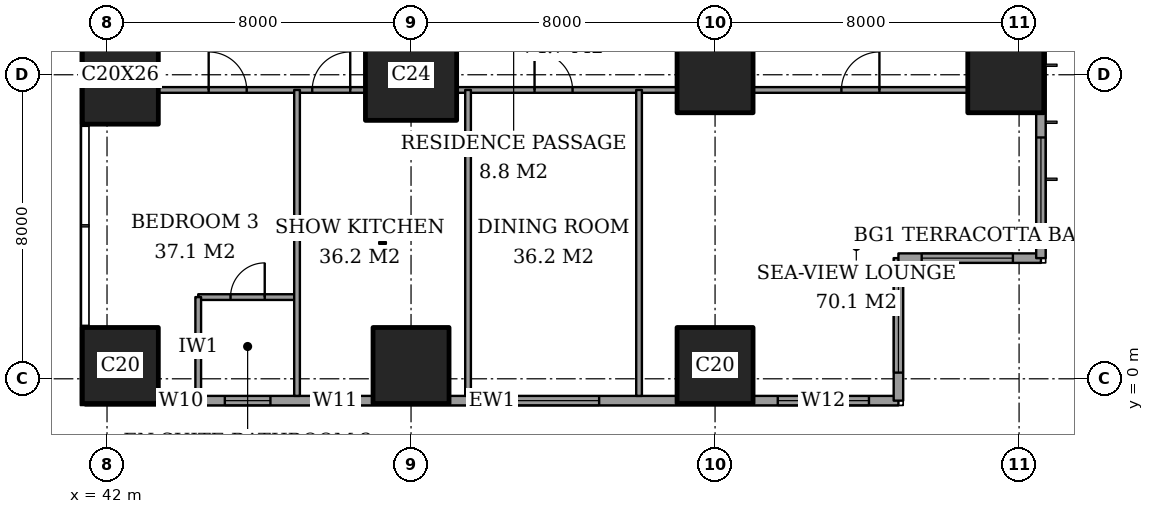
"""IFC4 building model, lengths in metres.
Left out: names, types, materials, properties, quantities, classifications, styles, units other than length and angle.
Written with IfcOpenShell. Run it as: python <this file> out.ifc"""

import sys

from ifc_helpers import new_model, si_unit, direction, frame, frame_2d, origin, origin_2d, place, context, subcontext, project, spatial, rectangle, extrude, element, fill, save


model = new_model("IFC4")
c1 = context("Model", 3, precision=1e-05, world=origin(), true_north=direction((0.0, 1.0)))
c2 = subcontext(c1, "Body", "Model", "MODEL_VIEW")
j1 = project(units=[si_unit("LENGTHUNIT", "METRE"), si_unit("PLANEANGLEUNIT", "RADIAN")], contexts=[c1])
p1 = place(None, origin())
s1 = spatial("IfcSite", under=j1, at=p1, CompositionType="ELEMENT")
p2 = place(p1, origin())
s2 = spatial("IfcBuilding", under=s1, at=p2, CompositionType="ELEMENT")
p3 = place(p2, frame((0.0, 0.0, 103.4)))
s3 = spatial("IfcBuildingStorey", under=s2, at=p3, CompositionType="ELEMENT", Elevation=103.4)
p4 = place(p3, frame((42.35, 0.35, 0.0), z_axis=(0.0, 0.0, 1.0), x_axis=(1.0, 0.0, 0.0)))
e1 = element("IfcColumn", 1, at=p4, inside=s3, PredefinedType="COLUMN", context=c2, shape_type="SweptSolid", body=[
    extrude(rectangle(XDim=2.0, YDim=2.0, at=origin_2d()), origin(), (0.0, 0.0, 1.0), 3.6),
])
p5 = place(p3, frame((42.35, 8.0, 0.0), z_axis=(0.0, 0.0, 1.0), x_axis=(1.0, 0.0, 0.0)))
e2 = element("IfcColumn", 2, at=p5, inside=s3, PredefinedType="COLUMN", context=c2, shape_type="SweptSolid", body=[
    extrude(rectangle(XDim=2.0, YDim=2.6, at=origin_2d()), origin(), (0.0, 0.0, 1.0), 3.6),
])
p6 = place(p3, frame((50.0, 0.35, 0.0), z_axis=(0.0, 0.0, 1.0), x_axis=(1.0, 0.0, 0.0)))
e3 = element("IfcColumn", 3, at=p6, inside=s3, PredefinedType="COLUMN", context=c2, shape_type="SweptSolid", body=[
    extrude(rectangle(XDim=2.0, YDim=2.0, at=origin_2d()), origin(), (0.0, 0.0, 1.0), 3.6),
])
p7 = place(p3, frame((50.0, 8.0, 0.0), z_axis=(0.0, 0.0, 1.0), x_axis=(1.0, 0.0, 0.0)))
e4 = element("IfcColumn", 4, at=p7, inside=s3, PredefinedType="COLUMN", context=c2, shape_type="SweptSolid", body=[
    extrude(rectangle(XDim=2.4, YDim=2.4, at=origin_2d()), origin(), (0.0, 0.0, 1.0), 3.6),
])
for number, where, z_axis, x_axis in (
    (5, (58.0, 0.35, 0.0), (0.0, 0.0, 1.0), (1.0, 0.0, 0.0)),
    (6, (58.0, 8.0, 0.0), (0.0, 0.0, 1.0), (1.0, 0.0, 0.0)),
    (7, (65.65, 8.0, 0.0), (0.0, 0.0, 1.0), (1.0, 0.0, 0.0)),
):
    element("IfcColumn", number, at=place(p3, frame(where, z_axis=z_axis, x_axis=x_axis)), inside=s3, PredefinedType="COLUMN", context=c2, shape_type="SweptSolid", body=[
        extrude(rectangle(XDim=2.0, YDim=2.0, at=origin_2d()), origin(), (0.0, 0.0, 1.0), 3.6),
    ])
p8 = place(p3, frame((41.425, -0.575, 0.0), z_axis=(0.0, 0.0, 1.0), x_axis=(1.0, 0.0, 0.0)))
e8 = element("IfcWall", 8, at=p8, inside=s3, PredefinedType="SOLIDWALL", context=c2, shape_type="SweptSolid", body=[
    extrude(rectangle(XDim=21.4, YDim=0.25, at=frame_2d((10.7, 0.0))), origin(), (0.0, 0.0, 1.0), 3.6),
])
p9 = place(p8, frame((2.225, 0.0, 0.4)))
e9 = element("IfcOpeningElement", 9, at=p9, cuts=e8, PredefinedType="OPENING", context=c2, shape_type="SweptSolid", body=[
    extrude(rectangle(XDim=0.6, YDim=2.2, at=frame_2d((0.3, 1.1))), frame((0.0, 0.135, 0.0), z_axis=(0.0, -1.0, 0.0), x_axis=(1.0, 0.0, 0.0)), (0.0, 0.0, 1.0), 0.27),
])
p10 = place(p8, frame((3.675, 0.0, 0.4)))
e10 = element("IfcOpeningElement", 10, at=p10, cuts=e8, PredefinedType="OPENING", context=c2, shape_type="SweptSolid", body=[
    extrude(rectangle(XDim=1.2, YDim=2.2, at=frame_2d((0.6, 1.1))), frame((0.0, 0.135, 0.0), z_axis=(0.0, -1.0, 0.0), x_axis=(1.0, 0.0, 0.0)), (0.0, 0.0, 1.0), 0.27),
])
p11 = place(p8, frame((5.975, 0.0, 0.4)))
e11 = element("IfcOpeningElement", 11, at=p11, cuts=e8, PredefinedType="OPENING", context=c2, shape_type="SweptSolid", body=[
    extrude(rectangle(XDim=1.2, YDim=2.2, at=frame_2d((0.6, 1.1))), frame((0.0, 0.135, 0.0), z_axis=(0.0, -1.0, 0.0), x_axis=(1.0, 0.0, 0.0)), (0.0, 0.0, 1.0), 0.27),
])
p12 = place(p8, frame((11.125, 0.0, 0.4)))
e12 = element("IfcOpeningElement", 12, at=p12, cuts=e8, PredefinedType="OPENING", context=c2, shape_type="SweptSolid", body=[
    extrude(rectangle(XDim=2.4, YDim=2.2, at=frame_2d((1.2, 1.1))), frame((0.0, 0.135, 0.0), z_axis=(0.0, -1.0, 0.0), x_axis=(1.0, 0.0, 0.0)), (0.0, 0.0, 1.0), 0.27),
])
p13 = place(p8, frame((18.225, 0.0, 0.4)))
e13 = element("IfcOpeningElement", 13, at=p13, cuts=e8, PredefinedType="OPENING", context=c2, shape_type="SweptSolid", body=[
    extrude(rectangle(XDim=2.4, YDim=2.2, at=frame_2d((1.2, 1.1))), frame((0.0, 0.135, 0.0), z_axis=(0.0, -1.0, 0.0), x_axis=(1.0, 0.0, 0.0)), (0.0, 0.0, 1.0), 0.27),
])
p14 = place(p3, frame((62.825, -0.575, 0.0), z_axis=(0.0, 0.0, 1.0), x_axis=(0.0, 1.0, 0.0)))
e14 = element("IfcWall", 14, at=p14, inside=s3, PredefinedType="SOLIDWALL", context=c2, shape_type="SweptSolid", body=[
    extrude(rectangle(XDim=3.75, YDim=0.25, at=frame_2d((1.875, 0.0))), origin(), (0.0, 0.0, 1.0), 3.6),
])
p15 = place(p14, frame((0.738, 0.0, 0.4)))
e15 = element("IfcOpeningElement", 15, at=p15, cuts=e14, PredefinedType="OPENING", context=c2, shape_type="SweptSolid", body=[
    extrude(rectangle(XDim=2.4, YDim=2.2, at=frame_2d((1.2, 1.1))), frame((0.0, 0.135, 0.0), z_axis=(0.0, -1.0, 0.0), x_axis=(1.0, 0.0, 0.0)), (0.0, 0.0, 1.0), 0.27),
])
p16 = place(p3, frame((62.825, 3.175, 0.0), z_axis=(0.0, 0.0, 1.0), x_axis=(1.0, 0.0, 0.0)))
e16 = element("IfcWall", 16, at=p16, inside=s3, PredefinedType="SOLIDWALL", context=c2, shape_type="SweptSolid", body=[
    extrude(rectangle(XDim=3.75, YDim=0.25, at=frame_2d((1.875, 0.0))), origin(), (0.0, 0.0, 1.0), 3.6),
])
p17 = place(p16, frame((0.613, 0.0, 0.4)))
e17 = element("IfcOpeningElement", 17, at=p17, cuts=e16, PredefinedType="OPENING", context=c2, shape_type="SweptSolid", body=[
    extrude(rectangle(XDim=2.4, YDim=2.2, at=frame_2d((1.2, 1.1))), frame((0.0, 0.135, 0.0), z_axis=(0.0, -1.0, 0.0), x_axis=(1.0, 0.0, 0.0)), (0.0, 0.0, 1.0), 0.27),
])
p18 = place(p3, frame((66.575, 3.175, 0.0), z_axis=(0.0, 0.0, 1.0), x_axis=(0.0, 1.0, 0.0)))
e18 = element("IfcWall", 18, at=p18, inside=s3, PredefinedType="SOLIDWALL", context=c2, shape_type="SweptSolid", body=[
    extrude(rectangle(XDim=41.65, YDim=0.25, at=frame_2d((20.825, 0.0))), origin(), (0.0, 0.0, 1.0), 3.6),
])
p19 = place(p18, frame((0.775, 0.0, 0.4)))
e19 = element("IfcOpeningElement", 19, at=p19, cuts=e18, PredefinedType="OPENING", context=c2, shape_type="SweptSolid", body=[
    extrude(rectangle(XDim=2.4, YDim=2.2, at=frame_2d((1.2, 1.1))), frame((0.0, 0.135, 0.0), z_axis=(0.0, -1.0, 0.0), x_axis=(1.0, 0.0, 0.0)), (0.0, 0.0, 1.0), 0.27),
])
p20 = place(p18, frame((6.1, 0.0, 0.4)))
e20 = element("IfcOpeningElement", 20, at=p20, cuts=e18, PredefinedType="OPENING", context=c2, shape_type="SweptSolid", body=[
    extrude(rectangle(XDim=1.2, YDim=2.2, at=frame_2d((0.6, 1.1))), frame((0.0, 0.135, 0.0), z_axis=(0.0, -1.0, 0.0), x_axis=(1.0, 0.0, 0.0)), (0.0, 0.0, 1.0), 0.27),
])
p21 = place(p18, frame((8.275, 0.0, 0.4)))
e21 = element("IfcOpeningElement", 21, at=p21, cuts=e18, PredefinedType="OPENING", context=c2, shape_type="SweptSolid", body=[
    extrude(rectangle(XDim=2.4, YDim=2.2, at=frame_2d((1.2, 1.1))), frame((0.0, 0.135, 0.0), z_axis=(0.0, -1.0, 0.0), x_axis=(1.0, 0.0, 0.0)), (0.0, 0.0, 1.0), 0.27),
])
p22 = place(p18, frame((15.775, 0.0, 0.4)))
e22 = element("IfcOpeningElement", 22, at=p22, cuts=e18, PredefinedType="OPENING", context=c2, shape_type="SweptSolid", body=[
    extrude(rectangle(XDim=2.4, YDim=2.2, at=frame_2d((1.2, 1.1))), frame((0.0, 0.135, 0.0), z_axis=(0.0, -1.0, 0.0), x_axis=(1.0, 0.0, 0.0)), (0.0, 0.0, 1.0), 0.27),
])
p23 = place(p18, frame((23.475, 0.0, 0.4)))
e23 = element("IfcOpeningElement", 23, at=p23, cuts=e18, PredefinedType="OPENING", context=c2, shape_type="SweptSolid", body=[
    extrude(rectangle(XDim=2.4, YDim=2.2, at=frame_2d((1.2, 1.1))), frame((0.0, 0.135, 0.0), z_axis=(0.0, -1.0, 0.0), x_axis=(1.0, 0.0, 0.0)), (0.0, 0.0, 1.0), 0.27),
])
p24 = place(p18, frame((30.975, 0.0, 0.4)))
e24 = element("IfcOpeningElement", 24, at=p24, cuts=e18, PredefinedType="OPENING", context=c2, shape_type="SweptSolid", body=[
    extrude(rectangle(XDim=2.4, YDim=2.2, at=frame_2d((1.2, 1.1))), frame((0.0, 0.135, 0.0), z_axis=(0.0, -1.0, 0.0), x_axis=(1.0, 0.0, 0.0)), (0.0, 0.0, 1.0), 0.27),
])
p25 = place(p18, frame((34.5, 0.0, 0.4)))
e25 = element("IfcOpeningElement", 25, at=p25, cuts=e18, PredefinedType="OPENING", context=c2, shape_type="SweptSolid", body=[
    extrude(rectangle(XDim=1.2, YDim=2.2, at=frame_2d((0.6, 1.1))), frame((0.0, 0.135, 0.0), z_axis=(0.0, -1.0, 0.0), x_axis=(1.0, 0.0, 0.0)), (0.0, 0.0, 1.0), 0.27),
])
p26 = place(p18, frame((38.475, 0.0, 0.4)))
e26 = element("IfcOpeningElement", 26, at=p26, cuts=e18, PredefinedType="OPENING", context=c2, shape_type="SweptSolid", body=[
    extrude(rectangle(XDim=2.4, YDim=2.2, at=frame_2d((1.2, 1.1))), frame((0.0, 0.135, 0.0), z_axis=(0.0, -1.0, 0.0), x_axis=(1.0, 0.0, 0.0)), (0.0, 0.0, 1.0), 0.27),
])
p27 = place(p3, frame((44.4, 2.15, 0.0), z_axis=(0.0, 0.0, 1.0), x_axis=(1.0, 0.0, 0.0)))
e27 = element("IfcWall", 27, at=p27, inside=s3, PredefinedType="PARTITIONING", context=c2, shape_type="SweptSolid", body=[
    extrude(rectangle(XDim=2.6, YDim=0.15, at=frame_2d((1.3, 0.0))), origin(), (0.0, 0.0, 1.0), 3.35),
])
p28 = place(p27, frame((0.85, 0.0, 0.0)))
e28 = element("IfcOpeningElement", 28, at=p28, cuts=e27, PredefinedType="OPENING", context=c2, shape_type="SweptSolid", body=[
    extrude(rectangle(XDim=0.9, YDim=2.1, at=frame_2d((0.45, 1.05))), frame((0.0, 0.085, 0.0), z_axis=(0.0, -1.0, 0.0), x_axis=(1.0, 0.0, 0.0)), (0.0, 0.0, 1.0), 0.17),
])
p29 = place(p3, frame((43.35, 7.6, 0.0), z_axis=(0.0, 0.0, 1.0), x_axis=(1.0, 0.0, 0.0)))
e29 = element("IfcWall", 29, at=p29, inside=s3, PredefinedType="PARTITIONING", context=c2, shape_type="SweptSolid", body=[
    extrude(rectangle(XDim=5.45, YDim=0.15, at=frame_2d((2.725, 0.0))), origin(), (0.0, 0.0, 1.0), 3.35),
])
p30 = place(p29, frame((4.05, 0.0, 0.0)))
e30 = element("IfcOpeningElement", 30, at=p30, cuts=e29, PredefinedType="OPENING", context=c2, shape_type="SweptSolid", body=[
    extrude(rectangle(XDim=1.0, YDim=2.1, at=frame_2d((0.5, 1.05))), frame((0.0, 0.085, 0.0), z_axis=(0.0, -1.0, 0.0), x_axis=(1.0, 0.0, 0.0)), (0.0, 0.0, 1.0), 0.17),
])
p31 = place(p29, frame((1.325, 0.0, 0.0)))
e31 = element("IfcOpeningElement", 31, at=p31, cuts=e29, PredefinedType="OPENING", context=c2, shape_type="SweptSolid", body=[
    extrude(rectangle(XDim=1.0, YDim=2.1, at=frame_2d((0.5, 1.05))), frame((0.0, 0.085, 0.0), z_axis=(0.0, -1.0, 0.0), x_axis=(1.0, 0.0, 0.0)), (0.0, 0.0, 1.0), 0.17),
])
p32 = place(p3, frame((51.2, 7.6, 0.0), z_axis=(0.0, 0.0, 1.0), x_axis=(1.0, 0.0, 0.0)))
e32 = element("IfcWall", 32, at=p32, inside=s3, PredefinedType="PARTITIONING", context=c2, shape_type="SweptSolid", body=[
    extrude(rectangle(XDim=5.8, YDim=0.15, at=frame_2d((2.9, 0.0))), origin(), (0.0, 0.0, 1.0), 3.35),
])
p33 = place(p32, frame((2.05, 0.0, 0.0)))
e33 = element("IfcOpeningElement", 33, at=p33, cuts=e32, PredefinedType="OPENING", context=c2, shape_type="SweptSolid", body=[
    extrude(rectangle(XDim=1.0, YDim=2.1, at=frame_2d((0.5, 1.05))), frame((0.0, 0.085, 0.0), z_axis=(0.0, -1.0, 0.0), x_axis=(1.0, 0.0, 0.0)), (0.0, 0.0, 1.0), 0.17),
])
p34 = place(p3, frame((59.0, 7.6, 0.0), z_axis=(0.0, 0.0, 1.0), x_axis=(1.0, 0.0, 0.0)))
e34 = element("IfcWall", 34, at=p34, inside=s3, PredefinedType="PARTITIONING", context=c2, shape_type="SweptSolid", body=[
    extrude(rectangle(XDim=5.65, YDim=0.15, at=frame_2d((2.825, 0.0))), origin(), (0.0, 0.0, 1.0), 3.35),
])
p35 = place(p34, frame((2.325, 0.0, 0.0)))
e35 = element("IfcOpeningElement", 35, at=p35, cuts=e34, PredefinedType="OPENING", context=c2, shape_type="SweptSolid", body=[
    extrude(rectangle(XDim=1.0, YDim=2.1, at=frame_2d((0.5, 1.05))), frame((0.0, 0.085, 0.0), z_axis=(0.0, -1.0, 0.0), x_axis=(1.0, 0.0, 0.0)), (0.0, 0.0, 1.0), 0.17),
])
p36 = place(p3, frame((44.4, -0.45, 0.0), z_axis=(0.0, 0.0, 1.0), x_axis=(0.0, 1.0, 0.0)))
e36 = element("IfcWall", 36, at=p36, inside=s3, PredefinedType="PARTITIONING", context=c2, shape_type="SweptSolid", body=[
    extrude(rectangle(XDim=2.6, YDim=0.15, at=frame_2d((1.3, 0.0))), origin(), (0.0, 0.0, 1.0), 3.35),
])
for number, where, z_axis, x_axis in (
    (37, (47.0, -0.45, 0.0), (0.0, 0.0, 1.0), (0.0, 1.0, 0.0)),
    (38, (51.5, -0.45, 0.0), (0.0, 0.0, 1.0), (0.0, 1.0, 0.0)),
    (39, (56.0, -0.45, 0.0), (0.0, 0.0, 1.0), (0.0, 1.0, 0.0)),
):
    element("IfcWall", number, at=place(p3, frame(where, z_axis=z_axis, x_axis=x_axis)), inside=s3, PredefinedType="PARTITIONING", context=c2, shape_type="SweptSolid", body=[
        extrude(rectangle(XDim=8.05, YDim=0.15, at=frame_2d((4.025, 0.0))), origin(), (0.0, 0.0, 1.0), 3.35),
    ])
p37 = place(p9, origin())
e40 = element("IfcWindow", 40, at=p37, inside=s3, PartitioningType="SINGLE_PANEL", PredefinedType="WINDOW", context=c2, shape_type="SweptSolid", body=[
    extrude(rectangle(XDim=0.6, YDim=2.2, at=frame_2d((0.3, 1.1))), frame((0.0, 0.03, 0.0), z_axis=(0.0, -1.0, 0.0), x_axis=(1.0, 0.0, 0.0)), (0.0, 0.0, 1.0), 0.06),
])
fill(e9, e40)
p38 = place(p10, origin())
e41 = element("IfcWindow", 41, at=p38, inside=s3, PartitioningType="SINGLE_PANEL", PredefinedType="WINDOW", context=c2, shape_type="SweptSolid", body=[
    extrude(rectangle(XDim=1.2, YDim=2.2, at=frame_2d((0.6, 1.1))), frame((0.0, 0.03, 0.0), z_axis=(0.0, -1.0, 0.0), x_axis=(1.0, 0.0, 0.0)), (0.0, 0.0, 1.0), 0.06),
])
fill(e10, e41)
p39 = place(p11, origin())
e42 = element("IfcWindow", 42, at=p39, inside=s3, PartitioningType="SINGLE_PANEL", PredefinedType="WINDOW", context=c2, shape_type="SweptSolid", body=[
    extrude(rectangle(XDim=1.2, YDim=2.2, at=frame_2d((0.6, 1.1))), frame((0.0, 0.03, 0.0), z_axis=(0.0, -1.0, 0.0), x_axis=(1.0, 0.0, 0.0)), (0.0, 0.0, 1.0), 0.06),
])
fill(e11, e42)
p40 = place(p12, origin())
e43 = element("IfcWindow", 43, at=p40, inside=s3, PartitioningType="SINGLE_PANEL", PredefinedType="WINDOW", context=c2, shape_type="SweptSolid", body=[
    extrude(rectangle(XDim=2.4, YDim=2.2, at=frame_2d((1.2, 1.1))), frame((0.0, 0.03, 0.0), z_axis=(0.0, -1.0, 0.0), x_axis=(1.0, 0.0, 0.0)), (0.0, 0.0, 1.0), 0.06),
])
fill(e12, e43)
p41 = place(p13, origin())
e44 = element("IfcWindow", 44, at=p41, inside=s3, PartitioningType="SINGLE_PANEL", PredefinedType="WINDOW", context=c2, shape_type="SweptSolid", body=[
    extrude(rectangle(XDim=2.4, YDim=2.2, at=frame_2d((1.2, 1.1))), frame((0.0, 0.03, 0.0), z_axis=(0.0, -1.0, 0.0), x_axis=(1.0, 0.0, 0.0)), (0.0, 0.0, 1.0), 0.06),
])
fill(e13, e44)
p42 = place(p15, origin())
e45 = element("IfcWindow", 45, at=p42, inside=s3, PartitioningType="SINGLE_PANEL", PredefinedType="WINDOW", context=c2, shape_type="SweptSolid", body=[
    extrude(rectangle(XDim=2.4, YDim=2.2, at=frame_2d((1.2, 1.1))), frame((0.0, 0.03, 0.0), z_axis=(0.0, -1.0, 0.0), x_axis=(1.0, 0.0, 0.0)), (0.0, 0.0, 1.0), 0.06),
])
fill(e15, e45)
p43 = place(p17, origin())
e46 = element("IfcWindow", 46, at=p43, inside=s3, PartitioningType="SINGLE_PANEL", PredefinedType="WINDOW", context=c2, shape_type="SweptSolid", body=[
    extrude(rectangle(XDim=2.4, YDim=2.2, at=frame_2d((1.2, 1.1))), frame((0.0, 0.03, 0.0), z_axis=(0.0, -1.0, 0.0), x_axis=(1.0, 0.0, 0.0)), (0.0, 0.0, 1.0), 0.06),
])
fill(e17, e46)
p44 = place(p19, origin())
e47 = element("IfcWindow", 47, at=p44, inside=s3, PartitioningType="SINGLE_PANEL", PredefinedType="WINDOW", context=c2, shape_type="SweptSolid", body=[
    extrude(rectangle(XDim=2.4, YDim=2.2, at=frame_2d((1.2, 1.1))), frame((0.0, 0.03, 0.0), z_axis=(0.0, -1.0, 0.0), x_axis=(1.0, 0.0, 0.0)), (0.0, 0.0, 1.0), 0.06),
])
fill(e19, e47)
p45 = place(p35, origin())
e48 = element("IfcDoor", 48, at=p45, inside=s3, OperationType="SINGLE_SWING_LEFT", PredefinedType="DOOR", context=c2, shape_type="SweptSolid", body=[
    extrude(rectangle(XDim=1.0, YDim=2.1, at=frame_2d((0.5, 1.05))), frame((0.0, 0.025, 0.0), z_axis=(0.0, -1.0, 0.0), x_axis=(1.0, 0.0, 0.0)), (0.0, 0.0, 1.0), 0.05),
])
fill(e35, e48)
p46 = place(p33, origin())
e49 = element("IfcDoor", 49, at=p46, inside=s3, OperationType="SINGLE_SWING_RIGHT", PredefinedType="DOOR", context=c2, shape_type="SweptSolid", body=[
    extrude(rectangle(XDim=1.0, YDim=2.1, at=frame_2d((0.5, 1.05))), frame((0.0, 0.025, 0.0), z_axis=(0.0, -1.0, 0.0), x_axis=(1.0, 0.0, 0.0)), (0.0, 0.0, 1.0), 0.05),
])
fill(e33, e49)
p47 = place(p30, origin())
e50 = element("IfcDoor", 50, at=p47, inside=s3, OperationType="SINGLE_SWING_LEFT", PredefinedType="DOOR", context=c2, shape_type="SweptSolid", body=[
    extrude(rectangle(XDim=1.0, YDim=2.1, at=frame_2d((0.5, 1.05))), frame((0.0, 0.025, 0.0), z_axis=(0.0, -1.0, 0.0), x_axis=(1.0, 0.0, 0.0)), (0.0, 0.0, 1.0), 0.05),
])
fill(e30, e50)
p48 = place(p28, origin())
e51 = element("IfcDoor", 51, at=p48, inside=s3, OperationType="SINGLE_SWING_LEFT", PredefinedType="DOOR", context=c2, shape_type="SweptSolid", body=[
    extrude(rectangle(XDim=0.9, YDim=2.1, at=frame_2d((0.45, 1.05))), frame((0.0, 0.025, 0.0), z_axis=(0.0, -1.0, 0.0), x_axis=(1.0, 0.0, 0.0)), (0.0, 0.0, 1.0), 0.05),
])
fill(e28, e51)
p49 = place(p31, origin())
e52 = element("IfcDoor", 52, at=p49, inside=s3, OperationType="SINGLE_SWING_RIGHT", PredefinedType="DOOR", context=c2, shape_type="SweptSolid", body=[
    extrude(rectangle(XDim=1.0, YDim=2.1, at=frame_2d((0.5, 1.05))), frame((0.0, 0.025, 0.0), z_axis=(0.0, -1.0, 0.0), x_axis=(1.0, 0.0, 0.0)), (0.0, 0.0, 1.0), 0.05),
])
fill(e31, e52)
save(model, sys.argv[1])
